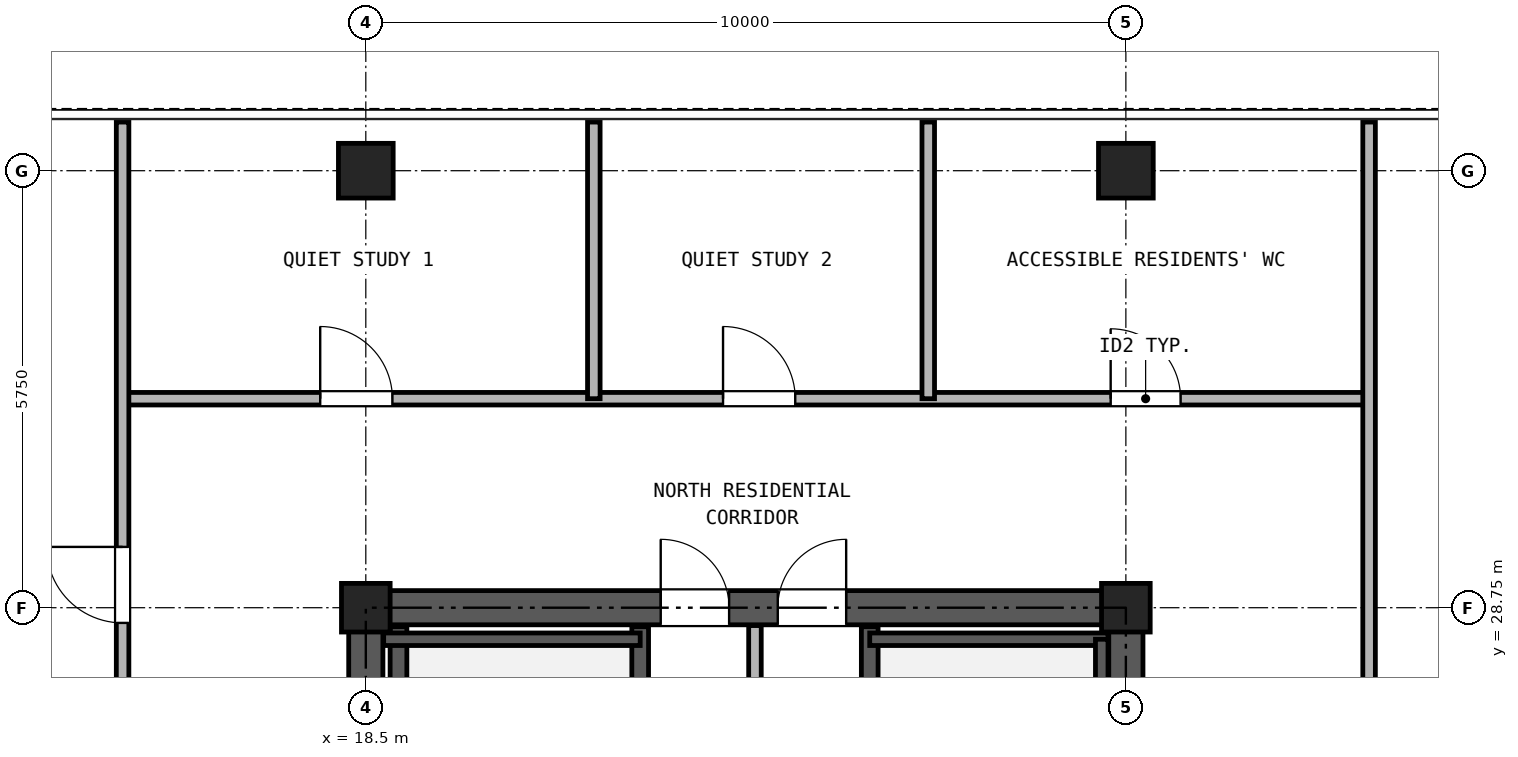
"""IFC4 building model, lengths in metres.
Left out: names, types, materials, properties, quantities, classifications, styles, units other than length and angle.
Written with IfcOpenShell. Run it as: python <this file> out.ifc"""

import sys

from ifc_helpers import new_model, si_unit, direction, frame, frame_2d, origin, origin_2d, place, context, subcontext, project, spatial, rectangle, hollow_rectangle, extrude, source, transform, mapped, element, fill, save


model = new_model("IFC4")
c1 = context("Model", 3, precision=1e-05, world=origin(), true_north=direction((0.0, 1.0)))
c2 = subcontext(c1, "Body", "Model", "MODEL_VIEW")
j1 = project(units=[si_unit("LENGTHUNIT", "METRE"), si_unit("PLANEANGLEUNIT", "RADIAN")], contexts=[c1])
p1 = place(None, origin())
s1 = spatial("IfcSite", under=j1, at=p1, CompositionType="ELEMENT")
p2 = place(p1, origin())
s2 = spatial("IfcBuilding", under=s1, at=p2, CompositionType="ELEMENT")
p3 = place(p2, frame((0.0, 0.0, 212.4)))
s3 = spatial("IfcBuildingStorey", under=s2, at=p3, CompositionType="ELEMENT", Elevation=212.4)
m1 = source(origin(), c2, "Body", "SweptSolid", [
    extrude(hollow_rectangle(XDim=0.72, YDim=0.72, WallThickness=0.04, at=origin_2d()), origin(), (0.0, 0.0, 1.0), 2.84),
])
for number, where, z_axis, x_axis in (
    (1, (18.5, 34.5, 0.0), (0.0, 0.0, 1.0), (1.0, 0.0, 0.0)),
    (2, (28.5, 34.5, 0.0), (0.0, 0.0, 1.0), (1.0, 0.0, 0.0)),
):
    element("IfcColumn", number, at=place(p3, frame(where, z_axis=z_axis, x_axis=x_axis)), inside=s3, PredefinedType="COLUMN", context=c2, shape_type="MappedRepresentation", body=[
        mapped(m1, transform((0.0, 0.0, 0.0), x_axis=(1.0, 0.0, 0.0), y_axis=(0.0, 1.0, 0.0), z_axis=(0.0, 0.0, 1.0), scale=1.0)),
    ])
m2 = source(origin(), c2, "Body", "SweptSolid", [
    extrude(hollow_rectangle(XDim=0.64, YDim=0.64, WallThickness=0.035, at=origin_2d()), origin(), (0.0, 0.0, 1.0), 2.84),
])
for number, where, z_axis, x_axis in (
    (3, (18.5, 28.75, 0.0), (0.0, 0.0, 1.0), (1.0, 0.0, 0.0)),
    (4, (28.5, 28.75, 0.0), (0.0, 0.0, 1.0), (1.0, 0.0, 0.0)),
):
    element("IfcColumn", number, at=place(p3, frame(where, z_axis=z_axis, x_axis=x_axis)), inside=s3, PredefinedType="COLUMN", context=c2, shape_type="MappedRepresentation", body=[
        mapped(m2, transform((0.0, 0.0, 0.0), x_axis=(1.0, 0.0, 0.0), y_axis=(0.0, 1.0, 0.0), z_axis=(0.0, 0.0, 1.0), scale=1.0)),
    ])
p4 = place(p3, frame((18.275, 28.75, 0.0), z_axis=(0.0, 0.0, 1.0), x_axis=(1.0, 0.0, 0.0)))
e5 = element("IfcWall", 5, at=p4, inside=s3, PredefinedType="SHEAR", context=c2, shape_type="SweptSolid", body=[
    extrude(rectangle(XDim=10.45, YDim=0.45, at=frame_2d((5.225, 0.0))), origin(), (0.0, 0.0, 1.0), 2.84),
])
p5 = place(p4, frame((4.105, 0.0, 0.0)))
e6 = element("IfcOpeningElement", 6, at=p5, cuts=e5, PredefinedType="OPENING", context=c2, shape_type="SweptSolid", body=[
    extrude(rectangle(XDim=0.9, YDim=2.05, at=frame_2d((0.45, 1.025))), frame((0.0, 0.235, 0.0), z_axis=(0.0, -1.0, 0.0), x_axis=(1.0, 0.0, 0.0)), (0.0, 0.0, 1.0), 0.47),
])
p6 = place(p4, frame((5.645, 0.0, 0.0)))
e7 = element("IfcOpeningElement", 7, at=p6, cuts=e5, PredefinedType="OPENING", context=c2, shape_type="SweptSolid", body=[
    extrude(rectangle(XDim=0.9, YDim=2.05, at=frame_2d((0.45, 1.025))), frame((0.0, 0.235, 0.0), z_axis=(0.0, -1.0, 0.0), x_axis=(1.0, 0.0, 0.0)), (0.0, 0.0, 1.0), 0.47),
])
p7 = place(p3, frame((18.5, 11.725, 0.0), z_axis=(0.0, 0.0, 1.0), x_axis=(0.0, 1.0, 0.0)))
e8 = element("IfcWall", 8, at=p7, inside=s3, PredefinedType="SHEAR", context=c2, shape_type="SweptSolid", body=[
    extrude(rectangle(XDim=16.8, YDim=0.45, at=frame_2d((8.4, 0.0))), origin(), (0.0, 0.0, 1.0), 2.84),
])
p8 = place(p7, frame((7.425, 0.0, 0.0)))
e9 = element("IfcOpeningElement", 9, at=p8, cuts=e8, PredefinedType="OPENING", context=c2, shape_type="SweptSolid", body=[
    extrude(rectangle(XDim=1.15, YDim=2.2, at=frame_2d((0.575, 1.1))), frame((0.0, 0.235, 0.0), z_axis=(0.0, -1.0, 0.0), x_axis=(1.0, 0.0, 0.0)), (0.0, 0.0, 1.0), 0.47),
])
p9 = place(p3, frame((28.5, 11.725, 0.0), z_axis=(0.0, 0.0, 1.0), x_axis=(0.0, 1.0, 0.0)))
e10 = element("IfcWall", 10, at=p9, inside=s3, PredefinedType="SHEAR", context=c2, shape_type="SweptSolid", body=[
    extrude(rectangle(XDim=16.8, YDim=0.45, at=frame_2d((8.4, 0.0))), origin(), (0.0, 0.0, 1.0), 2.84),
])
p10 = place(p9, frame((7.425, 0.0, 0.0)))
e11 = element("IfcOpeningElement", 11, at=p10, cuts=e10, PredefinedType="OPENING", context=c2, shape_type="SweptSolid", body=[
    extrude(rectangle(XDim=1.15, YDim=2.2, at=frame_2d((0.575, 1.1))), frame((0.0, 0.235, 0.0), z_axis=(0.0, -1.0, 0.0), x_axis=(1.0, 0.0, 0.0)), (0.0, 0.0, 1.0), 0.47),
])
for number, where, z_axis, x_axis in (
    (12, (18.93, 21.39, 0.0), (0.0, 0.0, 1.0), (0.0, 1.0, 0.0)),
    (13, (22.11, 21.39, 0.0), (0.0, 0.0, 1.0), (0.0, 1.0, 0.0)),
    (14, (25.13, 21.39, 0.0), (0.0, 0.0, 1.0), (0.0, 1.0, 0.0)),
):
    element("IfcWall", number, at=place(p3, frame(where, z_axis=z_axis, x_axis=x_axis)), inside=s3, PredefinedType="SOLIDWALL", context=c2, shape_type="SweptSolid", body=[
        extrude(rectangle(XDim=7.11, YDim=0.22, at=frame_2d((3.555, 0.0))), origin(), (0.0, 0.0, 1.0), 2.84),
    ])
p11 = place(p3, frame((18.735, 28.335, 0.0), z_axis=(0.0, 0.0, 1.0), x_axis=(1.0, 0.0, 0.0)))
e15 = element("IfcWall", 15, at=p11, inside=s3, PredefinedType="PARTITIONING", context=c2, shape_type="SweptSolid", body=[
    extrude(rectangle(XDim=3.375, YDim=0.165, at=frame_2d((1.688, 0.0))), origin(), (0.0, 0.0, 1.0), 2.84),
])
p12 = place(p3, frame((25.13, 28.335, 0.0), z_axis=(0.0, 0.0, 1.0), x_axis=(1.0, 0.0, 0.0)))
e16 = element("IfcWall", 16, at=p12, inside=s3, PredefinedType="PARTITIONING", context=c2, shape_type="SweptSolid", body=[
    extrude(rectangle(XDim=3.135, YDim=0.165, at=frame_2d((1.567, 0.0))), origin(), (0.0, 0.0, 1.0), 2.84),
])
p13 = place(p3, frame((28.183, 21.39, 0.0), z_axis=(0.0, 0.0, 1.0), x_axis=(0.0, 1.0, 0.0)))
e17 = element("IfcWall", 17, at=p13, inside=s3, PredefinedType="PARTITIONING", context=c2, shape_type="SweptSolid", body=[
    extrude(rectangle(XDim=6.945, YDim=0.165, at=frame_2d((3.473, 0.0))), origin(), (0.0, 0.0, 1.0), 2.84),
])
p14 = place(p3, frame((23.62, 24.4, 0.0), z_axis=(0.0, 0.0, 1.0), x_axis=(0.0, 1.0, 0.0)))
e18 = element("IfcWall", 18, at=p14, inside=s3, PredefinedType="PARTITIONING", context=c2, shape_type="SweptSolid", body=[
    extrude(rectangle(XDim=4.115, YDim=0.165, at=frame_2d((2.058, 0.0))), origin(), (0.0, 0.0, 1.0), 2.84),
])
p15 = place(p3, frame((15.3, 31.5, 0.0), z_axis=(0.0, 0.0, 1.0), x_axis=(1.0, 0.0, 0.0)))
e19 = element("IfcWall", 19, at=p15, inside=s3, PredefinedType="PARTITIONING", context=c2, shape_type="SweptSolid", body=[
    extrude(rectangle(XDim=16.4, YDim=0.165, at=frame_2d((8.2, 0.0))), origin(), (0.0, 0.0, 1.0), 2.473),
])
p16 = place(p15, frame((2.6, 0.0, 0.0)))
e20 = element("IfcOpeningElement", 20, at=p16, cuts=e19, PredefinedType="OPENING", context=c2, shape_type="SweptSolid", body=[
    extrude(rectangle(XDim=0.95, YDim=2.15, at=frame_2d((0.475, 1.075))), frame((0.0, 0.093, 0.0), z_axis=(0.0, -1.0, 0.0), x_axis=(1.0, 0.0, 0.0)), (0.0, 0.0, 1.0), 0.185),
])
p17 = place(p15, frame((7.9, 0.0, 0.0)))
e21 = element("IfcOpeningElement", 21, at=p17, cuts=e19, PredefinedType="OPENING", context=c2, shape_type="SweptSolid", body=[
    extrude(rectangle(XDim=0.95, YDim=2.15, at=frame_2d((0.475, 1.075))), frame((0.0, 0.093, 0.0), z_axis=(0.0, -1.0, 0.0), x_axis=(1.0, 0.0, 0.0)), (0.0, 0.0, 1.0), 0.185),
])
p18 = place(p15, frame((13.0, 0.0, 0.0)))
e22 = element("IfcOpeningElement", 22, at=p18, cuts=e19, PredefinedType="OPENING", context=c2, shape_type="SweptSolid", body=[
    extrude(rectangle(XDim=0.92, YDim=2.1, at=frame_2d((0.46, 1.05))), frame((0.0, 0.093, 0.0), z_axis=(0.0, -1.0, 0.0), x_axis=(1.0, 0.0, 0.0)), (0.0, 0.0, 1.0), 0.185),
])
p19 = place(p3, frame((15.3, 10.75, 0.0), z_axis=(0.0, 0.0, 1.0), x_axis=(0.0, 1.0, 0.0)))
e23 = element("IfcWall", 23, at=p19, inside=s3, PredefinedType="PARTITIONING", context=c2, shape_type="SweptSolid", body=[
    extrude(rectangle(XDim=24.39, YDim=0.165, at=frame_2d((12.195, 0.0))), origin(), (0.0, 0.0, 1.0), 2.84),
])
p20 = place(p19, frame((3.225, 0.0, 0.0)))
e24 = element("IfcOpeningElement", 24, at=p20, cuts=e23, PredefinedType="OPENING", context=c2, shape_type="SweptSolid", body=[
    extrude(rectangle(XDim=1.0, YDim=2.15, at=frame_2d((0.5, 1.075))), frame((0.0, 0.093, 0.0), z_axis=(0.0, -1.0, 0.0), x_axis=(1.0, 0.0, 0.0)), (0.0, 0.0, 1.0), 0.185),
])
p21 = place(p19, frame((11.15, 0.0, 0.0)))
e25 = element("IfcOpeningElement", 25, at=p21, cuts=e23, PredefinedType="OPENING", context=c2, shape_type="SweptSolid", body=[
    extrude(rectangle(XDim=1.0, YDim=2.15, at=frame_2d((0.5, 1.075))), frame((0.0, 0.093, 0.0), z_axis=(0.0, -1.0, 0.0), x_axis=(1.0, 0.0, 0.0)), (0.0, 0.0, 1.0), 0.185),
])
p22 = place(p19, frame((17.8, 0.0, 0.0)))
e26 = element("IfcOpeningElement", 26, at=p22, cuts=e23, PredefinedType="OPENING", context=c2, shape_type="SweptSolid", body=[
    extrude(rectangle(XDim=1.0, YDim=2.15, at=frame_2d((0.5, 1.075))), frame((0.0, 0.093, 0.0), z_axis=(0.0, -1.0, 0.0), x_axis=(1.0, 0.0, 0.0)), (0.0, 0.0, 1.0), 0.185),
])
p23 = place(p3, frame((31.7, 10.75, 0.0), z_axis=(0.0, 0.0, 1.0), x_axis=(0.0, 1.0, 0.0)))
e27 = element("IfcWall", 27, at=p23, inside=s3, PredefinedType="PARTITIONING", context=c2, shape_type="SweptSolid", body=[
    extrude(rectangle(XDim=24.39, YDim=0.165, at=frame_2d((12.195, 0.0))), origin(), (0.0, 0.0, 1.0), 2.84),
])
p24 = place(p23, frame((9.875, 0.0, 0.0)))
e28 = element("IfcOpeningElement", 28, at=p24, cuts=e27, PredefinedType="OPENING", context=c2, shape_type="SweptSolid", body=[
    extrude(rectangle(XDim=1.0, YDim=2.15, at=frame_2d((0.5, 1.075))), frame((0.0, 0.093, 0.0), z_axis=(0.0, -1.0, 0.0), x_axis=(1.0, 0.0, 0.0)), (0.0, 0.0, 1.0), 0.185),
])
for number, where, z_axis, x_axis in (
    (29, (21.5, 31.5, 0.0), (0.0, 0.0, 1.0), (0.0, 1.0, 0.0)),
    (30, (25.9, 31.5, 0.0), (0.0, 0.0, 1.0), (0.0, 1.0, 0.0)),
):
    element("IfcWall", number, at=place(p3, frame(where, z_axis=z_axis, x_axis=x_axis)), inside=s3, PredefinedType="PARTITIONING", context=c2, shape_type="SweptSolid", body=[
        extrude(rectangle(XDim=3.64, YDim=0.165, at=frame_2d((1.82, 0.0))), origin(), (0.0, 0.0, 1.0), 2.84),
    ])
p25 = place(p5, origin())
e31 = element("IfcDoor", 31, at=p25, inside=s3, OperationType="SINGLE_SWING_LEFT", PredefinedType="DOOR", context=c2, shape_type="SweptSolid", body=[
    extrude(rectangle(XDim=0.9, YDim=2.05, at=frame_2d((0.45, 1.025))), frame((0.0, 0.025, 0.0), z_axis=(0.0, -1.0, 0.0), x_axis=(1.0, 0.0, 0.0)), (0.0, 0.0, 1.0), 0.05),
])
fill(e6, e31)
p26 = place(p6, origin())
e32 = element("IfcDoor", 32, at=p26, inside=s3, OperationType="SINGLE_SWING_RIGHT", PredefinedType="DOOR", context=c2, shape_type="SweptSolid", body=[
    extrude(rectangle(XDim=0.9, YDim=2.05, at=frame_2d((0.45, 1.025))), frame((0.0, 0.025, 0.0), z_axis=(0.0, -1.0, 0.0), x_axis=(1.0, 0.0, 0.0)), (0.0, 0.0, 1.0), 0.05),
])
fill(e7, e32)
p27 = place(p22, origin())
e33 = element("IfcDoor", 33, at=p27, inside=s3, OperationType="SINGLE_SWING_RIGHT", PredefinedType="DOOR", context=c2, shape_type="SweptSolid", body=[
    extrude(rectangle(XDim=1.0, YDim=2.15, at=frame_2d((0.5, 1.075))), frame((0.0, 0.025, 0.0), z_axis=(0.0, -1.0, 0.0), x_axis=(1.0, 0.0, 0.0)), (0.0, 0.0, 1.0), 0.05),
])
fill(e26, e33)
p28 = place(p16, origin())
e34 = element("IfcDoor", 34, at=p28, inside=s3, OperationType="SINGLE_SWING_LEFT", PredefinedType="DOOR", context=c2, shape_type="SweptSolid", body=[
    extrude(rectangle(XDim=0.95, YDim=2.15, at=frame_2d((0.475, 1.075))), frame((0.0, 0.025, 0.0), z_axis=(0.0, -1.0, 0.0), x_axis=(1.0, 0.0, 0.0)), (0.0, 0.0, 1.0), 0.05),
])
fill(e20, e34)
p29 = place(p17, origin())
e35 = element("IfcDoor", 35, at=p29, inside=s3, OperationType="SINGLE_SWING_LEFT", PredefinedType="DOOR", context=c2, shape_type="SweptSolid", body=[
    extrude(rectangle(XDim=0.95, YDim=2.15, at=frame_2d((0.475, 1.075))), frame((0.0, 0.025, 0.0), z_axis=(0.0, -1.0, 0.0), x_axis=(1.0, 0.0, 0.0)), (0.0, 0.0, 1.0), 0.05),
])
fill(e21, e35)
p30 = place(p18, origin())
e36 = element("IfcDoor", 36, at=p30, inside=s3, OperationType="SINGLE_SWING_LEFT", PredefinedType="DOOR", context=c2, shape_type="SweptSolid", body=[
    extrude(rectangle(XDim=0.92, YDim=2.1, at=frame_2d((0.46, 1.05))), frame((0.0, 0.025, 0.0), z_axis=(0.0, -1.0, 0.0), x_axis=(1.0, 0.0, 0.0)), (0.0, 0.0, 1.0), 0.05),
])
fill(e22, e36)
save(model, sys.argv[1])
